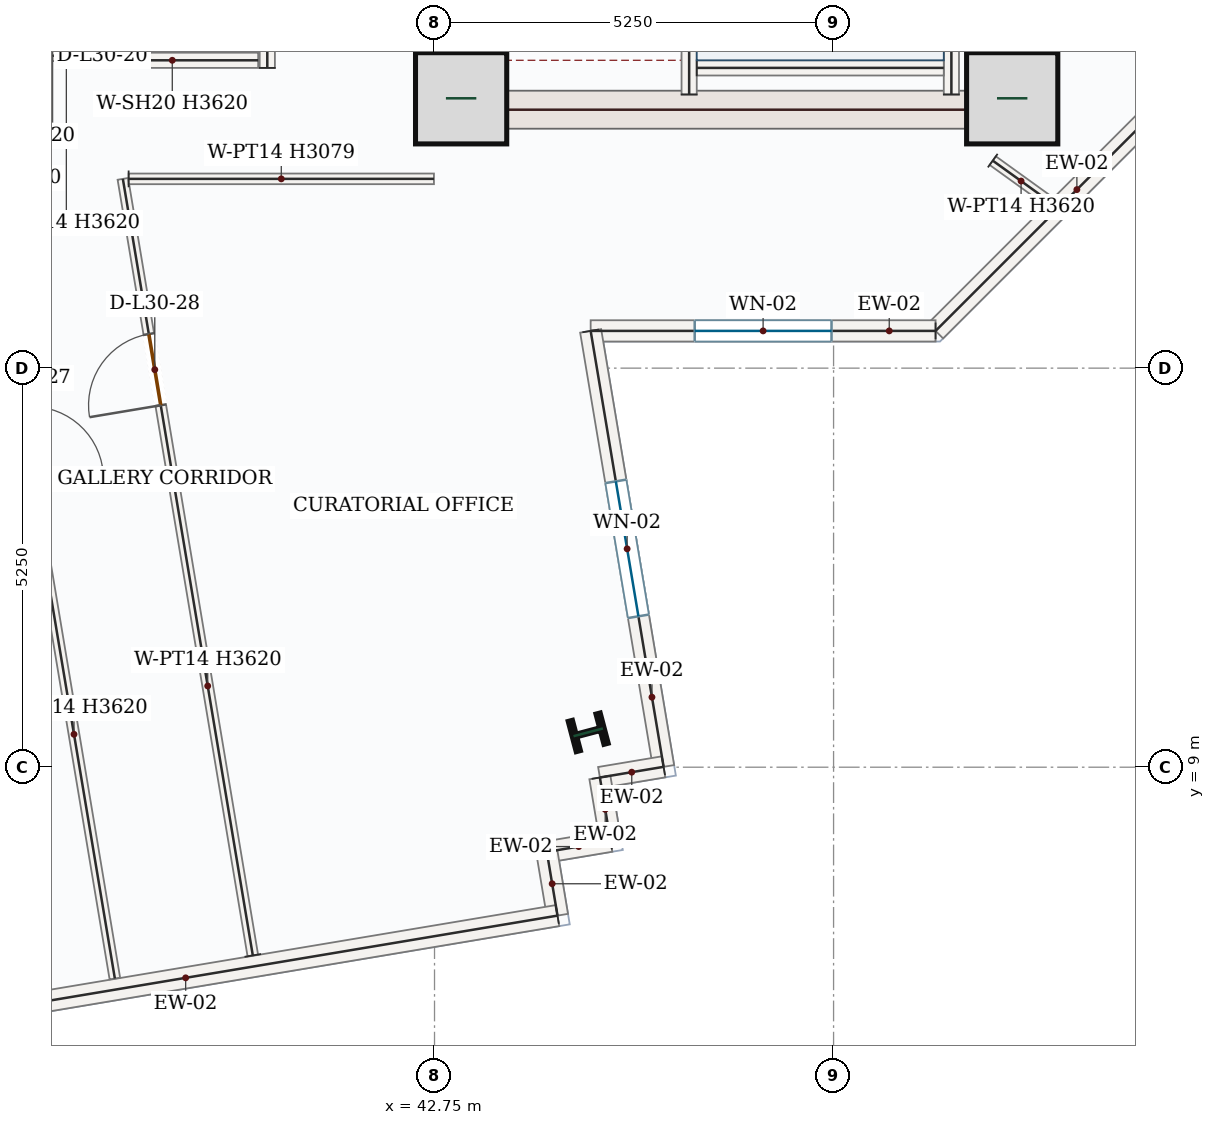
"""IFC4 building model, lengths in metres.
Left out: names, types, materials, properties, quantities, classifications, styles, units other than length and angle.
Written with IfcOpenShell. Run it as: python <this file> out.ifc"""

import sys

from ifc_helpers import new_model, si_unit, direction, frame, frame_2d, origin, origin_2d, place, context, subcontext, project, spatial, rectangle, i_section, extrude, source, transform, mapped, element, fill, save


model = new_model("IFC4")
c1 = context("Model", 3, precision=1e-05, world=origin(), true_north=direction((0.0, 1.0)))
c2 = subcontext(c1, "Body", "Model", "MODEL_VIEW")
j1 = project(units=[si_unit("LENGTHUNIT", "METRE"), si_unit("PLANEANGLEUNIT", "RADIAN")], contexts=[c1])
p1 = place(None, origin())
s1 = spatial("IfcSite", under=j1, at=p1, CompositionType="ELEMENT")
p2 = place(p1, origin())
s2 = spatial("IfcBuilding", under=s1, at=p2, CompositionType="ELEMENT")
p3 = place(p2, frame((0.0, 0.0, 135.6)))
s3 = spatial("IfcBuildingStorey", under=s2, at=p3, CompositionType="ELEMENT", Elevation=135.6)
p4 = place(p3, frame((43.0, 17.4, 0.0), z_axis=(0.0, 0.0, 1.0), x_axis=(0.0, 1.0, 0.0)))
e1 = element("IfcWall", 1, at=p4, inside=s3, PredefinedType="SHEAR", context=c2, shape_type="SweptSolid", body=[
    extrude(rectangle(XDim=8.55, YDim=0.5, at=frame_2d((4.275, 0.0))), origin(), (0.0, 0.0, 1.0), 3.62),
])
p5 = place(p4, frame((6.65, 0.0, 0.0)))
e2 = element("IfcOpeningElement", 2, at=p5, cuts=e1, PredefinedType="OPENING", context=c2, shape_type="SweptSolid", body=[
    extrude(rectangle(XDim=1.1, YDim=2.2, at=frame_2d((0.55, 1.1))), frame((0.0, 0.26, 0.0), z_axis=(0.0, -1.0, 0.0), x_axis=(1.0, 0.0, 0.0)), (0.0, 0.0, 1.0), 0.52),
])
p6 = place(p4, frame((1.75, 0.0, 0.0)))
e3 = element("IfcOpeningElement", 3, at=p6, cuts=e1, PredefinedType="OPENING", context=c2, shape_type="SweptSolid", body=[
    extrude(rectangle(XDim=1.3, YDim=2.2, at=frame_2d((0.65, 1.1))), frame((0.0, 0.26, 0.0), z_axis=(0.0, -1.0, 0.0), x_axis=(1.0, 0.0, 0.0)), (0.0, 0.0, 1.0), 0.52),
])
p7 = place(p4, frame((4.3, 0.0, 0.0)))
e4 = element("IfcOpeningElement", 4, at=p7, cuts=e1, PredefinedType="OPENING", context=c2, shape_type="SweptSolid", body=[
    extrude(rectangle(XDim=0.88, YDim=2.1, at=frame_2d((0.44, 1.05))), frame((0.0, 0.26, 0.0), z_axis=(0.0, -1.0, 0.0), x_axis=(1.0, 0.0, 0.0)), (0.0, 0.0, 1.0), 0.52),
])
m1 = source(origin(), c2, "Body", "SweptSolid", [
    extrude(rectangle(XDim=8.55, YDim=0.5, at=frame_2d((4.275, 0.0))), origin(), (0.0, 0.0, 1.0), 3.62),
])
p8 = place(p3, frame((50.5, 17.4, 0.0), z_axis=(0.0, 0.0, 1.0), x_axis=(0.0, 1.0, 0.0)))
e5 = element("IfcWall", 5, at=p8, inside=s3, PredefinedType="SHEAR", context=c2, shape_type="MappedRepresentation", body=[
    mapped(m1, transform((0.0, 0.0, 0.0), x_axis=(1.0, 0.0, 0.0), y_axis=(0.0, 1.0, 0.0), z_axis=(0.0, 0.0, 1.0), scale=1.0)),
])
m2 = source(origin(), c2, "Body", "SweptSolid", [
    extrude(rectangle(XDim=7.0, YDim=0.5, at=frame_2d((3.5, 0.0))), origin(), (0.0, 0.0, 1.0), 3.62),
])
p9 = place(p3, frame((43.25, 17.65, 0.0), z_axis=(0.0, 0.0, 1.0), x_axis=(1.0, 0.0, 0.0)))
e6 = element("IfcWall", 6, at=p9, inside=s3, PredefinedType="SHEAR", context=c2, shape_type="MappedRepresentation", body=[
    mapped(m2, transform((0.0, 0.0, 0.0), x_axis=(1.0, 0.0, 0.0), y_axis=(0.0, 1.0, 0.0), z_axis=(0.0, 0.0, 1.0), scale=1.0)),
])
m3 = source(origin(), c2, "Body", "SweptSolid", [
    extrude(rectangle(XDim=1.2, YDim=1.2, at=origin_2d()), origin(), (0.0, 0.0, 1.0), 3.9),
])
for number, where, z_axis, x_axis in (
    (7, (43.1, 17.8, 0.0), (0.0, 0.0, 1.0), (1.0, 0.0, 0.0)),
    (8, (50.35, 17.8, 0.0), (0.0, 0.0, 1.0), (1.0, 0.0, 0.0)),
):
    element("IfcColumn", number, at=place(p3, frame(where, z_axis=z_axis, x_axis=x_axis)), inside=s3, PredefinedType="COLUMN", context=c2, shape_type="MappedRepresentation", body=[
        mapped(m3, transform((0.0, 0.0, 0.0), x_axis=(1.0, 0.0, 0.0), y_axis=(0.0, 1.0, 0.0), z_axis=(0.0, 0.0, 1.0), scale=1.0)),
    ])
m4 = source(origin(), c2, "Body", "SweptSolid", [
    extrude(i_section(OverallWidth=0.412, OverallDepth=0.435, WebThickness=0.036, FlangeThickness=0.057, FilletRadius=0.018, at=origin_2d()), origin(), (0.0, 0.0, 1.0), 3.9),
])
p10 = place(p3, frame((44.772, 9.459, 0.0), z_axis=(0.0, 0.0, 1.0), x_axis=(-0.255445757936, 0.966823388604, 0.0)))
e9 = element("IfcColumn", 9, at=p10, inside=s3, PredefinedType="COLUMN", context=c2, shape_type="MappedRepresentation", body=[
    mapped(m4, transform((0.0, 0.0, 0.0), x_axis=(1.0, 0.0, 0.0), y_axis=(0.0, 1.0, 0.0), z_axis=(0.0, 0.0, 1.0), scale=1.0)),
])
m5 = source(origin(), c2, "Body", "SweptSolid", [
    extrude(rectangle(XDim=5.258, YDim=0.28, at=frame_2d((2.629, 0.0))), origin(), (0.0, 0.0, 1.0), 3.62),
])
p11 = place(p3, frame((53.06, 18.458, 0.0), z_axis=(0.0, 0.0, 1.0), x_axis=(-0.707106781187, -0.707106781187, 0.0)))
e10 = element("IfcWall", 10, at=p11, inside=s3, PredefinedType="SOLIDWALL", context=c2, shape_type="MappedRepresentation", body=[
    mapped(m5, transform((0.0, 0.0, 0.0), x_axis=(1.0, 0.0, 0.0), y_axis=(0.0, 1.0, 0.0), z_axis=(0.0, 0.0, 1.0), scale=1.0)),
])
p12 = place(p3, frame((49.342, 14.74, 0.0), z_axis=(0.0, 0.0, 1.0), x_axis=(-1.0, 0.0, 0.0)))
e11 = element("IfcWall", 11, at=p12, inside=s3, PredefinedType="SOLIDWALL", context=c2, shape_type="SweptSolid", body=[
    extrude(rectangle(XDim=4.538, YDim=0.28, at=frame_2d((2.269, 0.0))), origin(), (0.0, 0.0, 1.0), 3.62),
])
p13 = place(p12, frame((1.369, 0.0, 0.85)))
e12 = element("IfcOpeningElement", 12, at=p13, cuts=e11, PredefinedType="OPENING", context=c2, shape_type="SweptSolid", body=[
    extrude(rectangle(XDim=1.8, YDim=1.75, at=frame_2d((0.9, 0.875))), frame((0.0, 0.15, 0.0), z_axis=(0.0, -1.0, 0.0), x_axis=(1.0, 0.0, 0.0)), (0.0, 0.0, 1.0), 0.3),
])
p14 = place(p3, frame((44.804, 14.74, 0.0), z_axis=(0.0, 0.0, 1.0), x_axis=(0.165045758581, -0.986285910664, 0.0)))
e13 = element("IfcWall", 13, at=p14, inside=s3, PredefinedType="SOLIDWALL", context=c2, shape_type="SweptSolid", body=[
    extrude(rectangle(XDim=5.815, YDim=0.28, at=frame_2d((2.907, 0.0))), origin(), (0.0, 0.0, 1.0), 3.62),
])
p15 = place(p14, frame((2.007, 0.0, 0.85)))
e14 = element("IfcOpeningElement", 14, at=p15, cuts=e13, PredefinedType="OPENING", context=c2, shape_type="SweptSolid", body=[
    extrude(rectangle(XDim=1.8, YDim=1.75, at=frame_2d((0.9, 0.875))), frame((0.0, 0.15, 0.0), z_axis=(0.0, -1.0, 0.0), x_axis=(1.0, 0.0, 0.0)), (0.0, 0.0, 1.0), 0.3),
])
m6 = source(origin(), c2, "Body", "SweptSolid", [
    extrude(rectangle(XDim=0.85, YDim=0.28, at=frame_2d((0.425, 0.0))), origin(), (0.0, 0.0, 1.0), 3.62),
])
for number, where, z_axis, x_axis in (
    (15, (45.764, 9.005, 0.0), (0.0, 0.0, 1.0), (-0.986, -0.165, 0.0)),
    (16, (44.926, 8.865, 0.0), (0.0, 0.0, 1.0), (0.165, -0.986, 0.0)),
    (17, (45.066, 8.026, 0.0), (0.0, 0.0, 1.0), (-0.986, -0.165, 0.0)),
):
    element("IfcWall", number, at=place(p3, frame(where, z_axis=z_axis, x_axis=x_axis)), inside=s3, PredefinedType="SOLIDWALL", context=c2, shape_type="MappedRepresentation", body=[
        mapped(m6, transform((0.0, 0.0, 0.0), x_axis=(1.0, 0.0, 0.0), y_axis=(0.0, 1.0, 0.0), z_axis=(0.0, 0.0, 1.0), scale=1.0)),
    ])
m7 = source(origin(), c2, "Body", "SweptSolid", [
    extrude(rectangle(XDim=0.85, YDim=0.28, at=frame_2d((0.425, 0.0))), origin(), (0.0, 0.0, 1.0), 3.62),
])
p16 = place(p3, frame((44.228, 7.886, 0.0), z_axis=(0.0, 0.0, 1.0), x_axis=(0.165190918979, -0.986261608442, 0.0)))
e18 = element("IfcWall", 18, at=p16, inside=s3, PredefinedType="SOLIDWALL", context=c2, shape_type="MappedRepresentation", body=[
    mapped(m7, transform((0.0, 0.0, 0.0), x_axis=(1.0, 0.0, 0.0), y_axis=(0.0, 1.0, 0.0), z_axis=(0.0, 0.0, 1.0), scale=1.0)),
])
m8 = source(origin(), c2, "Body", "SweptSolid", [
    extrude(rectangle(XDim=9.92, YDim=0.28, at=frame_2d((4.96, 0.0))), origin(), (0.0, 0.0, 1.0), 3.62),
])
p17 = place(p3, frame((44.368, 7.048, 0.0), z_axis=(0.0, 0.0, 1.0), x_axis=(-0.986282616944, -0.165065440096, 0.0)))
e19 = element("IfcWall", 19, at=p17, inside=s3, PredefinedType="SOLIDWALL", context=c2, shape_type="MappedRepresentation", body=[
    mapped(m8, transform((0.0, 0.0, 0.0), x_axis=(1.0, 0.0, 0.0), y_axis=(0.0, 1.0, 0.0), z_axis=(0.0, 0.0, 1.0), scale=1.0)),
])
m9 = source(origin(), c2, "Body", "SweptSolid", [
    extrude(rectangle(XDim=7.87, YDim=0.2, at=frame_2d((3.935, 0.0))), origin(), (0.0, 0.0, 1.0), 3.62),
])
p18 = place(p3, frame((49.55, 17.85, 0.0), z_axis=(0.0, 0.0, 1.0), x_axis=(0.0, 1.0, 0.0)))
e20 = element("IfcWall", 20, at=p18, inside=s3, PredefinedType="SOLIDWALL", context=c2, shape_type="MappedRepresentation", body=[
    mapped(m9, transform((0.0, 0.0, 0.0), x_axis=(1.0, 0.0, 0.0), y_axis=(0.0, 1.0, 0.0), z_axis=(0.0, 0.0, 1.0), scale=1.0)),
])
p19 = place(p3, frame((46.1, 17.85, 0.0), z_axis=(0.0, 0.0, 1.0), x_axis=(0.0, 1.0, 0.0)))
e21 = element("IfcWall", 21, at=p19, inside=s3, PredefinedType="SOLIDWALL", context=c2, shape_type="SweptSolid", body=[
    extrude(rectangle(XDim=8.0, YDim=0.2, at=frame_2d((4.0, 0.0))), origin(), (0.0, 0.0, 1.0), 3.62),
])
p20 = place(p19, frame((6.3, 0.0, 0.0)))
e22 = element("IfcOpeningElement", 22, at=p20, cuts=e21, PredefinedType="OPENING", context=c2, shape_type="SweptSolid", body=[
    extrude(rectangle(XDim=1.05, YDim=2.15, at=frame_2d((0.525, 1.075))), frame((0.0, 0.11, 0.0), z_axis=(0.0, -1.0, 0.0), x_axis=(1.0, 0.0, 0.0)), (0.0, 0.0, 1.0), 0.22),
])
m10 = source(origin(), c2, "Body", "SweptSolid", [
    extrude(rectangle(XDim=3.25, YDim=0.2, at=frame_2d((1.625, 0.0))), origin(), (0.0, 0.0, 1.0), 3.62),
])
p21 = place(p3, frame((46.2, 18.2, 0.0), z_axis=(0.0, 0.0, 1.0), x_axis=(1.0, 0.0, 0.0)))
e23 = element("IfcWall", 23, at=p21, inside=s3, PredefinedType="SOLIDWALL", context=c2, shape_type="MappedRepresentation", body=[
    mapped(m10, transform((0.0, 0.0, 0.0), x_axis=(1.0, 0.0, 0.0), y_axis=(0.0, 1.0, 0.0), z_axis=(0.0, 0.0, 1.0), scale=1.0)),
])
m11 = source(origin(), c2, "Body", "SweptSolid", [
    extrude(rectangle(XDim=2.35, YDim=0.2, at=frame_2d((1.175, 0.0))), origin(), (0.0, 0.0, 1.0), 3.62),
])
p22 = place(p3, frame((38.05, 18.2, 0.0), z_axis=(0.0, 0.0, 1.0), x_axis=(0.0, 1.0, 0.0)))
e24 = element("IfcWall", 24, at=p22, inside=s3, PredefinedType="SOLIDWALL", context=c2, shape_type="MappedRepresentation", body=[
    mapped(m11, transform((0.0, 0.0, 0.0), x_axis=(1.0, 0.0, 0.0), y_axis=(0.0, 1.0, 0.0), z_axis=(0.0, 0.0, 1.0), scale=1.0)),
])
p23 = place(p3, frame((40.55, 18.2, 0.0), z_axis=(0.0, 0.0, 1.0), x_axis=(0.0, 1.0, 0.0)))
e25 = element("IfcWall", 25, at=p23, inside=s3, PredefinedType="SOLIDWALL", context=c2, shape_type="SweptSolid", body=[
    extrude(rectangle(XDim=2.35, YDim=0.2, at=frame_2d((1.175, 0.0))), origin(), (0.0, 0.0, 1.0), 3.62),
])
p24 = place(p23, frame((0.625, 0.0, 0.0)))
e26 = element("IfcOpeningElement", 26, at=p24, cuts=e25, PredefinedType="OPENING", context=c2, shape_type="SweptSolid", body=[
    extrude(rectangle(XDim=1.1, YDim=2.15, at=frame_2d((0.55, 1.075))), frame((0.0, 0.11, 0.0), z_axis=(0.0, -1.0, 0.0), x_axis=(1.0, 0.0, 0.0)), (0.0, 0.0, 1.0), 0.22),
])
m12 = source(origin(), c2, "Body", "SweptSolid", [
    extrude(rectangle(XDim=2.26, YDim=0.2, at=frame_2d((1.13, 0.0))), origin(), (0.0, 0.0, 1.0), 3.62),
])
p25 = place(p3, frame((38.17, 18.3, 0.0), z_axis=(0.0, 0.0, 1.0), x_axis=(1.0, 0.0, 0.0)))
e27 = element("IfcWall", 27, at=p25, inside=s3, PredefinedType="SOLIDWALL", context=c2, shape_type="MappedRepresentation", body=[
    mapped(m12, transform((0.0, 0.0, 0.0), x_axis=(1.0, 0.0, 0.0), y_axis=(0.0, 1.0, 0.0), z_axis=(0.0, 0.0, 1.0), scale=1.0)),
])
p26 = place(p3, frame((37.945, 18.36, 0.0), z_axis=(0.0, 0.0, 1.0), x_axis=(-1.0, 0.0, 0.0)))
e28 = element("IfcWall", 28, at=p26, inside=s3, PredefinedType="PARTITIONING", context=c2, shape_type="SweptSolid", body=[
    extrude(rectangle(XDim=1.23, YDim=0.14, at=frame_2d((0.615, 0.0))), origin(), (0.0, 0.0, 1.0), 3.62),
])
p27 = place(p26, frame((0.228, 0.0, 0.0)))
e29 = element("IfcOpeningElement", 29, at=p27, cuts=e28, PredefinedType="OPENING", context=c2, shape_type="SweptSolid", body=[
    extrude(rectangle(XDim=0.88, YDim=2.1, at=frame_2d((0.44, 1.05))), frame((0.0, 0.08, 0.0), z_axis=(0.0, -1.0, 0.0), x_axis=(1.0, 0.0, 0.0)), (0.0, 0.0, 1.0), 0.16),
])
p28 = place(p3, frame((36.978, 15.585, 0.0), z_axis=(0.0, 0.0, 1.0), x_axis=(0.165024399413, -0.986289484684, 0.0)))
e30 = element("IfcWall", 30, at=p28, inside=s3, PredefinedType="PARTITIONING", context=c2, shape_type="SweptSolid", body=[
    extrude(rectangle(XDim=9.495, YDim=0.14, at=frame_2d((4.748, 0.0))), origin(), (0.0, 0.0, 1.0), 3.62),
])
p29 = place(p28, frame((1.88, 0.0, 0.0)))
e31 = element("IfcOpeningElement", 31, at=p29, cuts=e30, PredefinedType="OPENING", context=c2, shape_type="SweptSolid", body=[
    extrude(rectangle(XDim=0.95, YDim=2.15, at=frame_2d((0.475, 1.075))), frame((0.0, 0.08, 0.0), z_axis=(0.0, -1.0, 0.0), x_axis=(1.0, 0.0, 0.0)), (0.0, 0.0, 1.0), 0.16),
])
p30 = place(p3, frame((40.359, 6.524, 0.0), z_axis=(0.0, 0.0, 1.0), x_axis=(-0.165056345303, 0.986284139016, 0.0)))
e32 = element("IfcWall", 32, at=p30, inside=s3, PredefinedType="PARTITIONING", context=c2, shape_type="SweptSolid", body=[
    extrude(rectangle(XDim=10.358, YDim=0.14, at=frame_2d((5.179, 0.0))), origin(), (0.0, 0.0, 1.0), 3.62),
])
p31 = place(p30, frame((7.338, 0.0, 0.0)))
e33 = element("IfcOpeningElement", 33, at=p31, cuts=e32, PredefinedType="OPENING", context=c2, shape_type="SweptSolid", body=[
    extrude(rectangle(XDim=0.95, YDim=2.15, at=frame_2d((0.475, 1.075))), frame((0.0, 0.08, 0.0), z_axis=(0.0, -1.0, 0.0), x_axis=(1.0, 0.0, 0.0)), (0.0, 0.0, 1.0), 0.16),
])
m13 = source(origin(), c2, "Body", "SweptSolid", [
    extrude(rectangle(XDim=4.017, YDim=0.14, at=frame_2d((2.008, 0.0))), origin(), (0.0, 0.0, 1.0), 3.079),
])
p32 = place(p3, frame((38.726, 16.74, 0.0), z_axis=(0.0, 0.0, 1.0), x_axis=(0.999999998153, 6.0779189e-05, 0.0)))
e34 = element("IfcWall", 34, at=p32, inside=s3, PredefinedType="PARTITIONING", context=c2, shape_type="MappedRepresentation", body=[
    mapped(m13, transform((0.0, 0.0, 0.0), x_axis=(1.0, 0.0, 0.0), y_axis=(0.0, 1.0, 0.0), z_axis=(0.0, 0.0, 1.0), scale=1.0)),
])
m14 = source(origin(), c2, "Body", "SweptSolid", [
    extrude(rectangle(XDim=0.919, YDim=0.14, at=frame_2d((0.459, 0.0))), origin(), (0.0, 0.0, 1.0), 3.62),
])
p33 = place(p3, frame((50.094, 16.98, 0.0), z_axis=(0.0, 0.0, 1.0), x_axis=(0.81148395648, -0.584374698611, 0.0)))
e35 = element("IfcWall", 35, at=p33, inside=s3, PredefinedType="PARTITIONING", context=c2, shape_type="MappedRepresentation", body=[
    mapped(m14, transform((0.0, 0.0, 0.0), x_axis=(1.0, 0.0, 0.0), y_axis=(0.0, 1.0, 0.0), z_axis=(0.0, 0.0, 1.0), scale=1.0)),
])
m15 = source(origin(), c2, "Body", "SweptSolid", [
    extrude(rectangle(XDim=1.8, YDim=1.75, at=frame_2d((0.9, 0.875))), frame((0.0, 0.03, 0.0), z_axis=(0.0, -1.0, 0.0), x_axis=(1.0, 0.0, 0.0)), (0.0, 0.0, 1.0), 0.06),
])
p34 = place(p13, origin())
e36 = element("IfcWindow", 36, at=p34, inside=s3, PartitioningType="DOUBLE_PANEL_VERTICAL", PredefinedType="WINDOW", context=c2, shape_type="MappedRepresentation", body=[
    mapped(m15, transform((0.0, 0.0, 0.0), x_axis=(1.0, 0.0, 0.0), y_axis=(0.0, 1.0, 0.0), z_axis=(0.0, 0.0, 1.0), scale=1.0)),
])
fill(e12, e36)
p35 = place(p15, origin())
e37 = element("IfcWindow", 37, at=p35, inside=s3, PartitioningType="DOUBLE_PANEL_VERTICAL", PredefinedType="WINDOW", context=c2, shape_type="MappedRepresentation", body=[
    mapped(m15, transform((0.0, 0.0, 0.0), x_axis=(1.0, 0.0, 0.0), y_axis=(0.0, 1.0, 0.0), z_axis=(0.0, 0.0, 1.0), scale=1.0)),
])
fill(e14, e37)
m16 = source(origin(), c2, "Body", "SweptSolid", [
    extrude(rectangle(XDim=0.95, YDim=2.15, at=frame_2d((0.475, 1.075))), frame((0.0, 0.025, 0.0), z_axis=(0.0, -1.0, 0.0), x_axis=(1.0, 0.0, 0.0)), (0.0, 0.0, 1.0), 0.05),
])
p36 = place(p31, origin())
e38 = element("IfcDoor", 38, at=p36, inside=s3, OperationType="SINGLE_SWING_LEFT", PredefinedType="DOOR", context=c2, shape_type="MappedRepresentation", body=[
    mapped(m16, transform((0.0, 0.0, 0.0), x_axis=(1.0, 0.0, 0.0), y_axis=(0.0, 1.0, 0.0), z_axis=(0.0, 0.0, 1.0), scale=1.0)),
])
fill(e33, e38)
save(model, sys.argv[1])
